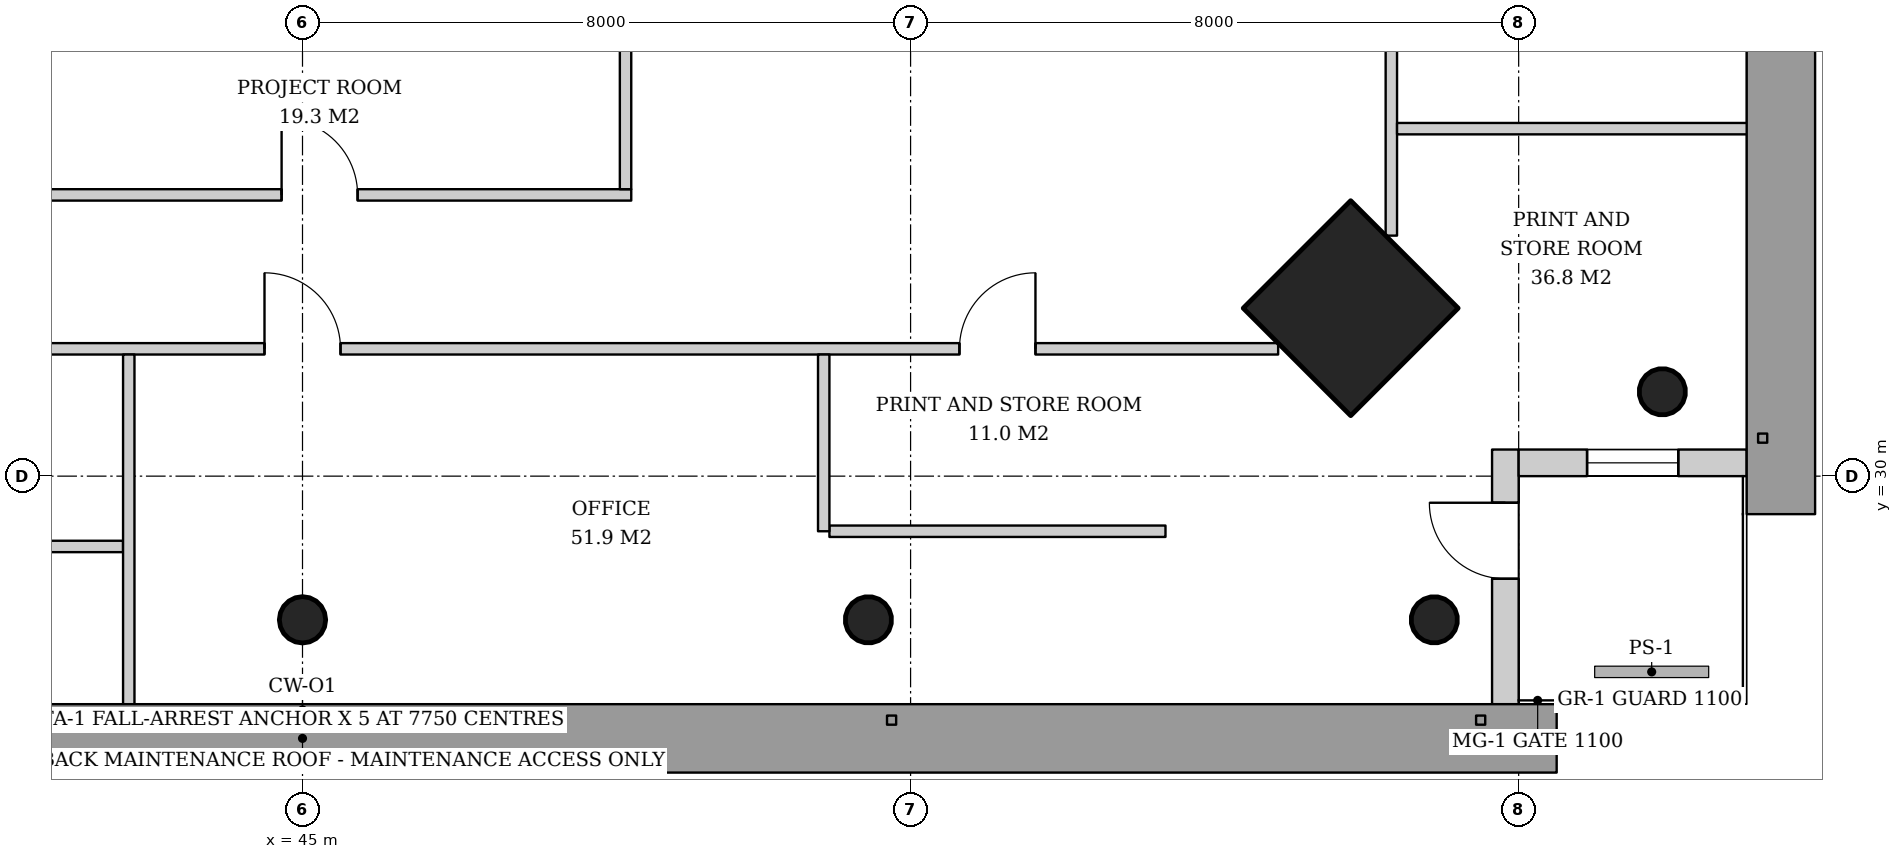
"""IFC4 building model, lengths in metres.
Left out: names, types, materials, properties, quantities, classifications, styles, units other than length and angle.
Written with IfcOpenShell. Run it as: python <this file> out.ifc"""

import sys

from ifc_helpers import new_model, si_unit, direction, frame, frame_2d, origin, origin_2d, place, context, subcontext, project, spatial, rectangle, hollow_circle, extrude, element, fill, save


model = new_model("IFC4")
c1 = context("Model", 3, precision=1e-05, world=origin(), true_north=direction((0.0, 1.0)))
c2 = subcontext(c1, "Body", "Model", "MODEL_VIEW")
j1 = project(units=[si_unit("LENGTHUNIT", "METRE"), si_unit("PLANEANGLEUNIT", "RADIAN")], contexts=[c1])
p1 = place(None, origin())
s1 = spatial("IfcSite", under=j1, at=p1, CompositionType="ELEMENT")
p2 = place(p1, origin())
s2 = spatial("IfcBuilding", under=s1, at=p2, CompositionType="ELEMENT")
p3 = place(p2, frame((0.0, 0.0, 211.0)))
s3 = spatial("IfcBuildingStorey", under=s2, at=p3, CompositionType="ELEMENT", Elevation=211.0)
p4 = place(p3, frame((62.928, 31.072, 0.0), z_axis=(-0.031898107953, 0.031898107953, 0.998981992539), x_axis=(-0.707106781187, -0.707106781187, 0.0)))
e1 = element("IfcColumn", 1, at=p4, inside=s3, PredefinedType="COLUMN", context=c2, shape_type="SweptSolid", body=[
    extrude(hollow_circle(Radius=0.305, WallThickness=0.025, at=origin_2d()), origin(), (0.0, 0.0, 1.0), 3.804),
])
p5 = place(p3, frame((58.829, 32.171, 0.0), z_axis=(-0.031962158256, 0.031962158256, 0.998977898093), x_axis=(-0.707106781187, -0.707106781187, 0.0)))
e2 = element("IfcColumn", 2, at=p5, inside=s3, PredefinedType="COLUMN", context=c2, shape_type="SweptSolid", body=[
    extrude(rectangle(XDim=2.0, YDim=2.0, at=origin_2d()), origin(), (0.0, 0.0, 1.0), 3.804),
])
p6 = place(p3, frame((59.928, 28.072, 0.0), z_axis=(-0.031898107953, 0.031898107953, 0.998981992539), x_axis=(-0.707106781187, -0.707106781187, 0.0)))
e3 = element("IfcColumn", 3, at=p6, inside=s3, PredefinedType="COLUMN", context=c2, shape_type="SweptSolid", body=[
    extrude(hollow_circle(Radius=0.305, WallThickness=0.025, at=origin_2d()), origin(), (0.0, 0.0, 1.0), 3.804),
])
p7 = place(p3, frame((45.0, 28.072, 0.0), z_axis=(0.0, 0.031914348339, 0.999490607445), x_axis=(-1.0, 0.0, 0.0)))
e4 = element("IfcColumn", 4, at=p7, inside=s3, PredefinedType="COLUMN", context=c2, shape_type="SweptSolid", body=[
    extrude(hollow_circle(Radius=0.305, WallThickness=0.025, at=origin_2d()), origin(), (0.0, 0.0, 1.0), 3.802),
])
p8 = place(p3, frame((52.464, 28.072, 0.0), z_axis=(-0.015987237665, 0.031910269556, 0.999362868496), x_axis=(-0.894067115991, -0.447933021895, 0.0)))
e5 = element("IfcColumn", 5, at=p8, inside=s3, PredefinedType="COLUMN", context=c2, shape_type="SweptSolid", body=[
    extrude(hollow_circle(Radius=0.305, WallThickness=0.025, at=origin_2d()), origin(), (0.0, 0.0, 1.0), 3.802),
])
p9 = place(p3, frame((60.825, 27.0, 0.0), z_axis=(0.0, 0.0, 1.0), x_axis=(0.0, 1.0, 0.0)))
e6 = element("IfcWall", 6, at=p9, inside=s3, PredefinedType="SOLIDWALL", context=c2, shape_type="SweptSolid", body=[
    extrude(rectangle(XDim=3.35, YDim=0.35, at=frame_2d((1.675, 0.0))), origin(), (0.0, 0.0, 1.0), 3.62),
])
p10 = place(p9, frame((1.65, 0.0, 0.0)))
e7 = element("IfcOpeningElement", 7, at=p10, cuts=e6, PredefinedType="OPENING", context=c2, shape_type="SweptSolid", body=[
    extrude(rectangle(XDim=1.0, YDim=2.4, at=frame_2d((0.5, 1.2))), frame((0.0, 0.185, 0.0), z_axis=(0.0, -1.0, 0.0), x_axis=(1.0, 0.0, 0.0)), (0.0, 0.0, 1.0), 0.37),
])
p11 = place(p3, frame((61.0, 30.175, 0.0), z_axis=(0.0, 0.0, 1.0), x_axis=(1.0, 0.0, 0.0)))
e8 = element("IfcWall", 8, at=p11, inside=s3, PredefinedType="SOLIDWALL", context=c2, shape_type="SweptSolid", body=[
    extrude(rectangle(XDim=3.0, YDim=0.35, at=frame_2d((1.5, 0.0))), origin(), (0.0, 0.0, 1.0), 3.62),
])
p12 = place(p11, frame((0.9, 0.0, 0.6)))
e9 = element("IfcOpeningElement", 9, at=p12, cuts=e8, PredefinedType="OPENING", context=c2, shape_type="SweptSolid", body=[
    extrude(rectangle(XDim=1.2, YDim=2.55, at=frame_2d((0.6, 1.275))), frame((0.0, 0.185, 0.0), z_axis=(0.0, -1.0, 0.0), x_axis=(1.0, 0.0, 0.0)), (0.0, 0.0, 1.0), 0.37),
])
p13 = place(p3, frame((41.125, 33.7, 0.0), z_axis=(0.0, 0.0, 1.0), x_axis=(1.0, 0.0, 0.0)))
e10 = element("IfcWall", 10, at=p13, inside=s3, PredefinedType="PARTITIONING", context=c2, shape_type="SweptSolid", body=[
    extrude(rectangle(XDim=8.2, YDim=0.15, at=frame_2d((4.1, 0.0))), origin(), (0.0, 0.0, 1.0), 2.867),
])
p14 = place(p13, frame((3.6, 0.0, 0.0)))
e11 = element("IfcOpeningElement", 11, at=p14, cuts=e10, PredefinedType="OPENING", context=c2, shape_type="SweptSolid", body=[
    extrude(rectangle(XDim=1.0, YDim=2.1, at=frame_2d((0.5, 1.05))), frame((0.0, 0.085, 0.0), z_axis=(0.0, -1.0, 0.0), x_axis=(1.0, 0.0, 0.0)), (0.0, 0.0, 1.0), 0.17),
])
p15 = place(p3, frame((49.25, 36.1, 0.0), z_axis=(0.0, 0.0, 1.0), x_axis=(0.0, -1.0, 0.0)))
e12 = element("IfcWall", 12, at=p15, inside=s3, PredefinedType="PARTITIONING", context=c2, shape_type="SweptSolid", body=[
    extrude(rectangle(XDim=2.325, YDim=0.15, at=frame_2d((1.163, 0.0))), origin(), (0.0, 0.0, 1.0), 3.62),
])
p16 = place(p3, frame((59.325, 33.164, 0.0), z_axis=(0.0, 0.0, 1.0), x_axis=(0.0, 1.0, 0.0)))
e13 = element("IfcWall", 13, at=p16, inside=s3, PredefinedType="PARTITIONING", context=c2, shape_type="SweptSolid", body=[
    extrude(rectangle(XDim=25.671, YDim=0.15, at=frame_2d((12.836, 0.0))), origin(), (0.0, 0.0, 1.0), 2.867),
])
p17 = place(p16, frame((3.193, 0.0, 0.0)))
e14 = element("IfcOpeningElement", 14, at=p17, cuts=e13, PredefinedType="OPENING", context=c2, shape_type="SweptSolid", body=[
    extrude(rectangle(XDim=1.0, YDim=2.1, at=frame_2d((0.5, 1.05))), frame((0.0, 0.085, 0.0), z_axis=(0.0, -1.0, 0.0), x_axis=(1.0, 0.0, 0.0)), (0.0, 0.0, 1.0), 0.17),
])
p18 = place(p16, frame((7.764, 0.0, 0.0)))
e15 = element("IfcOpeningElement", 15, at=p18, cuts=e13, PredefinedType="OPENING", context=c2, shape_type="SweptSolid", body=[
    extrude(rectangle(XDim=1.0, YDim=2.1, at=frame_2d((0.5, 1.05))), frame((0.0, 0.085, 0.0), z_axis=(0.0, -1.0, 0.0), x_axis=(1.0, 0.0, 0.0)), (0.0, 0.0, 1.0), 0.17),
])
p19 = place(p16, frame((12.336, 0.0, 0.0)))
e16 = element("IfcOpeningElement", 16, at=p19, cuts=e13, PredefinedType="OPENING", context=c2, shape_type="SweptSolid", body=[
    extrude(rectangle(XDim=1.0, YDim=2.1, at=frame_2d((0.5, 1.05))), frame((0.0, 0.085, 0.0), z_axis=(0.0, -1.0, 0.0), x_axis=(1.0, 0.0, 0.0)), (0.0, 0.0, 1.0), 0.17),
])
p20 = place(p16, frame((16.907, 0.0, 0.0)))
e17 = element("IfcOpeningElement", 17, at=p20, cuts=e13, PredefinedType="OPENING", context=c2, shape_type="SweptSolid", body=[
    extrude(rectangle(XDim=1.0, YDim=2.1, at=frame_2d((0.5, 1.05))), frame((0.0, 0.085, 0.0), z_axis=(0.0, -1.0, 0.0), x_axis=(1.0, 0.0, 0.0)), (0.0, 0.0, 1.0), 0.17),
])
p21 = place(p16, frame((21.479, 0.0, 0.0)))
e18 = element("IfcOpeningElement", 18, at=p21, cuts=e13, PredefinedType="OPENING", context=c2, shape_type="SweptSolid", body=[
    extrude(rectangle(XDim=1.0, YDim=2.1, at=frame_2d((0.5, 1.05))), frame((0.0, 0.085, 0.0), z_axis=(0.0, -1.0, 0.0), x_axis=(1.0, 0.0, 0.0)), (0.0, 0.0, 1.0), 0.17),
])
p22 = place(p3, frame((59.4, 34.572, 0.0), z_axis=(0.0, 0.0, 1.0), x_axis=(1.0, 0.0, 0.0)))
e19 = element("IfcWall", 19, at=p22, inside=s3, PredefinedType="PARTITIONING", context=c2, shape_type="SweptSolid", body=[
    extrude(rectangle(XDim=4.64, YDim=0.15, at=frame_2d((2.32, 0.0))), origin(), (0.0, 0.0, 1.0), 3.12),
])
p23 = place(p3, frame((38.218, 29.075, 0.0), z_axis=(0.0, 0.0, 1.0), x_axis=(1.0, 0.0, 0.0)))
e20 = element("IfcWall", 20, at=p23, inside=s3, PredefinedType="PARTITIONING", context=c2, shape_type="SweptSolid", body=[
    extrude(rectangle(XDim=4.422, YDim=0.15, at=frame_2d((2.211, 0.0))), origin(), (0.0, 0.0, 1.0), 2.867),
])
p24 = place(p3, frame((51.932, 29.275, 0.0), z_axis=(0.0, 0.0, 1.0), x_axis=(1.0, 0.0, 0.0)))
e21 = element("IfcWall", 21, at=p24, inside=s3, PredefinedType="PARTITIONING", context=c2, shape_type="SweptSolid", body=[
    extrude(rectangle(XDim=4.421, YDim=0.15, at=frame_2d((2.211, 0.0))), origin(), (0.0, 0.0, 1.0), 2.867),
])
p25 = place(p3, frame((32.164, 31.675, 0.0), z_axis=(0.0, 0.0, 1.0), x_axis=(1.0, 0.0, 0.0)))
e22 = element("IfcWall", 22, at=p25, inside=s3, PredefinedType="PARTITIONING", context=c2, shape_type="SweptSolid", body=[
    extrude(rectangle(XDim=25.671, YDim=0.15, at=frame_2d((12.836, 0.0))), origin(), (0.0, 0.0, 1.0), 2.867),
])
p26 = place(p25, frame((3.193, 0.0, 0.0)))
e23 = element("IfcOpeningElement", 23, at=p26, cuts=e22, PredefinedType="OPENING", context=c2, shape_type="SweptSolid", body=[
    extrude(rectangle(XDim=1.0, YDim=2.1, at=frame_2d((0.5, 1.05))), frame((0.0, 0.085, 0.0), z_axis=(0.0, -1.0, 0.0), x_axis=(1.0, 0.0, 0.0)), (0.0, 0.0, 1.0), 0.17),
])
p27 = place(p25, frame((7.764, 0.0, 0.0)))
e24 = element("IfcOpeningElement", 24, at=p27, cuts=e22, PredefinedType="OPENING", context=c2, shape_type="SweptSolid", body=[
    extrude(rectangle(XDim=1.0, YDim=2.1, at=frame_2d((0.5, 1.05))), frame((0.0, 0.085, 0.0), z_axis=(0.0, -1.0, 0.0), x_axis=(1.0, 0.0, 0.0)), (0.0, 0.0, 1.0), 0.17),
])
p28 = place(p25, frame((12.336, 0.0, 0.0)))
e25 = element("IfcOpeningElement", 25, at=p28, cuts=e22, PredefinedType="OPENING", context=c2, shape_type="SweptSolid", body=[
    extrude(rectangle(XDim=1.0, YDim=2.1, at=frame_2d((0.5, 1.05))), frame((0.0, 0.085, 0.0), z_axis=(0.0, -1.0, 0.0), x_axis=(1.0, 0.0, 0.0)), (0.0, 0.0, 1.0), 0.17),
])
p29 = place(p25, frame((21.479, 0.0, 0.0)))
e26 = element("IfcOpeningElement", 26, at=p29, cuts=e22, PredefinedType="OPENING", context=c2, shape_type="SweptSolid", body=[
    extrude(rectangle(XDim=1.0, YDim=2.1, at=frame_2d((0.5, 1.05))), frame((0.0, 0.085, 0.0), z_axis=(0.0, -1.0, 0.0), x_axis=(1.0, 0.0, 0.0)), (0.0, 0.0, 1.0), 0.17),
])
p30 = place(p3, frame((42.714, 31.6, 0.0), z_axis=(0.0, 0.0, 1.0), x_axis=(0.0, -1.0, 0.0)))
e27 = element("IfcWall", 27, at=p30, inside=s3, PredefinedType="PARTITIONING", context=c2, shape_type="SweptSolid", body=[
    extrude(rectangle(XDim=4.64, YDim=0.15, at=frame_2d((2.32, 0.0))), origin(), (0.0, 0.0, 1.0), 3.12),
])
p31 = place(p3, frame((51.857, 31.6, 0.0), z_axis=(0.0, 0.0, 1.0), x_axis=(0.0, -1.0, 0.0)))
e28 = element("IfcWall", 28, at=p31, inside=s3, PredefinedType="PARTITIONING", context=c2, shape_type="SweptSolid", body=[
    extrude(rectangle(XDim=2.325, YDim=0.15, at=frame_2d((1.163, 0.0))), origin(), (0.0, 0.0, 1.0), 3.62),
])
p32 = place(p10, origin())
e29 = element("IfcDoor", 29, at=p32, inside=s3, OperationType="SINGLE_SWING_RIGHT", PredefinedType="DOOR", context=c2, shape_type="SweptSolid", body=[
    extrude(rectangle(XDim=1.0, YDim=2.4, at=frame_2d((0.5, 1.2))), frame((0.0, 0.025, 0.0), z_axis=(0.0, -1.0, 0.0), x_axis=(1.0, 0.0, 0.0)), (0.0, 0.0, 1.0), 0.05),
])
fill(e7, e29)
p33 = place(p12, origin())
e30 = element("IfcWindow", 30, at=p33, inside=s3, PartitioningType="SINGLE_PANEL", PredefinedType="WINDOW", context=c2, shape_type="SweptSolid", body=[
    extrude(rectangle(XDim=1.2, YDim=2.55, at=frame_2d((0.6, 1.275))), frame((0.0, 0.03, 0.0), z_axis=(0.0, -1.0, 0.0), x_axis=(1.0, 0.0, 0.0)), (0.0, 0.0, 1.0), 0.06),
])
fill(e9, e30)
p34 = place(p14, origin())
e31 = element("IfcDoor", 31, at=p34, inside=s3, OperationType="SINGLE_SWING_LEFT", PredefinedType="DOOR", context=c2, shape_type="SweptSolid", body=[
    extrude(rectangle(XDim=1.0, YDim=2.1, at=frame_2d((0.5, 1.05))), frame((0.0, 0.025, 0.0), z_axis=(0.0, -1.0, 0.0), x_axis=(1.0, 0.0, 0.0)), (0.0, 0.0, 1.0), 0.05),
])
fill(e11, e31)
p35 = place(p28, origin())
e32 = element("IfcDoor", 32, at=p35, inside=s3, OperationType="SINGLE_SWING_LEFT", PredefinedType="DOOR", context=c2, shape_type="SweptSolid", body=[
    extrude(rectangle(XDim=1.0, YDim=2.1, at=frame_2d((0.5, 1.05))), frame((0.0, 0.025, 0.0), z_axis=(0.0, -1.0, 0.0), x_axis=(1.0, 0.0, 0.0)), (0.0, 0.0, 1.0), 0.05),
])
fill(e25, e32)
p36 = place(p29, origin())
e33 = element("IfcDoor", 33, at=p36, inside=s3, OperationType="SINGLE_SWING_RIGHT", PredefinedType="DOOR", context=c2, shape_type="SweptSolid", body=[
    extrude(rectangle(XDim=1.0, YDim=2.1, at=frame_2d((0.5, 1.05))), frame((0.0, 0.025, 0.0), z_axis=(0.0, -1.0, 0.0), x_axis=(1.0, 0.0, 0.0)), (0.0, 0.0, 1.0), 0.05),
])
fill(e26, e33)
save(model, sys.argv[1])
